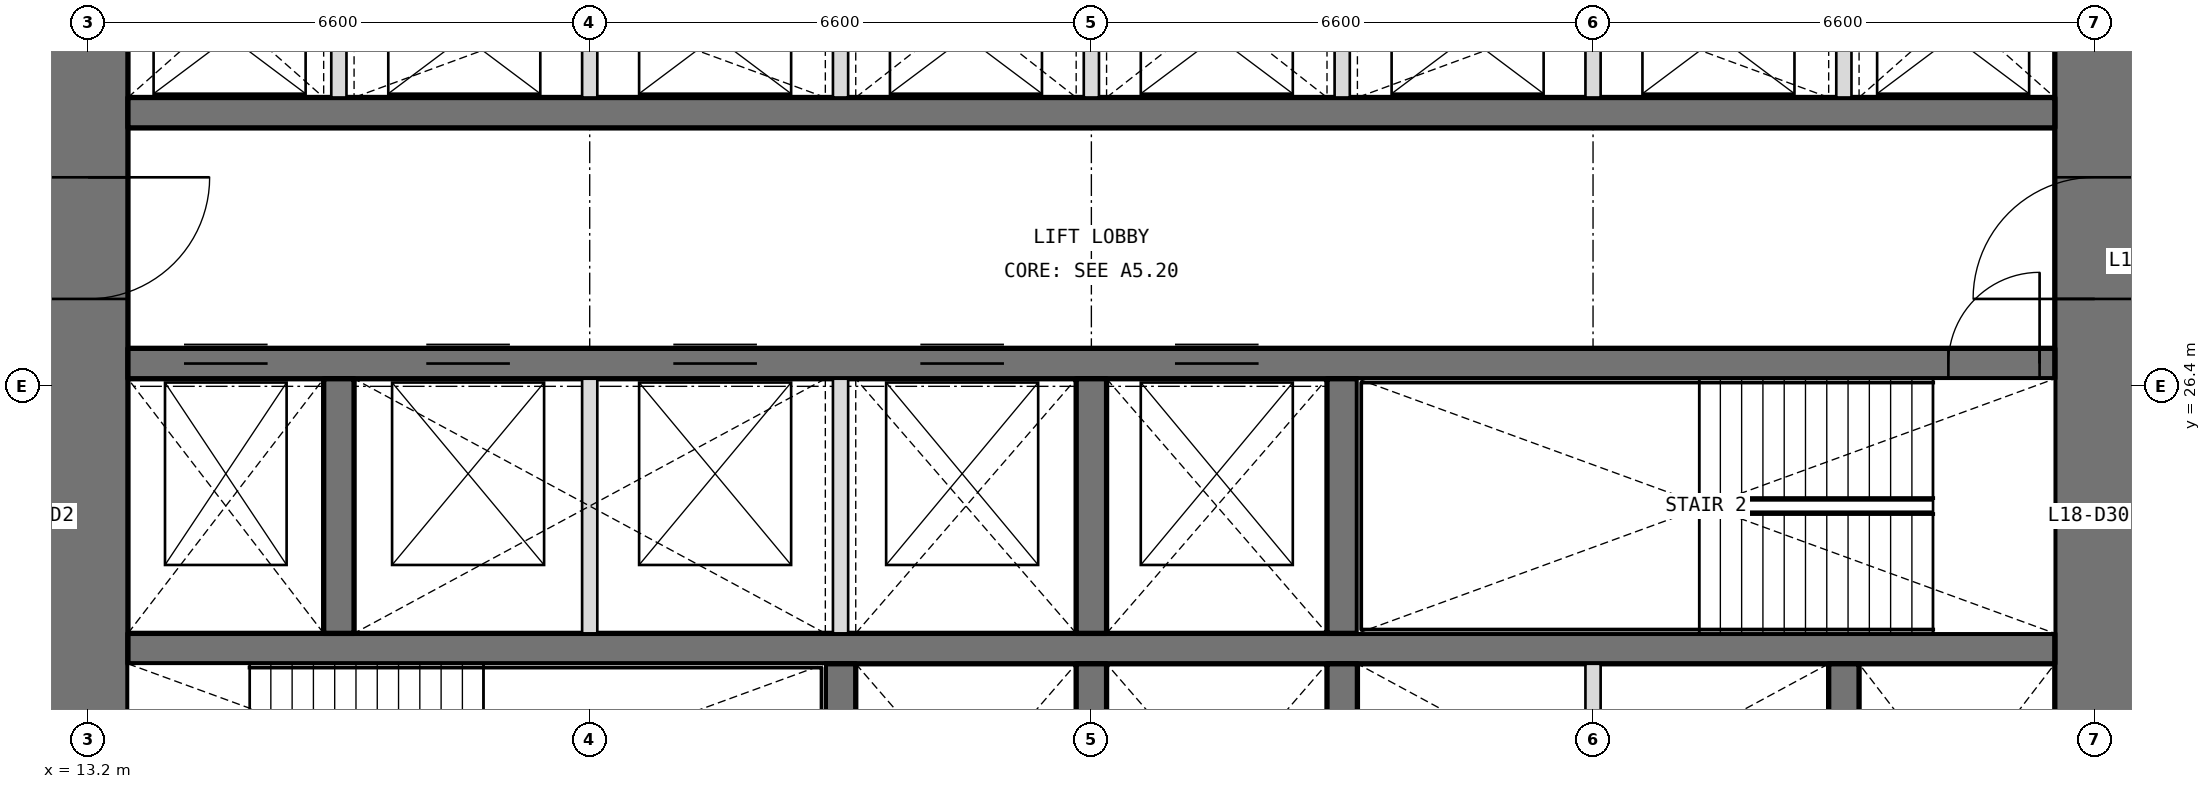
"""IFC4 building model, lengths in metres.
Left out: names, types, materials, properties, quantities, classifications, styles, units other than length and angle.
Written with IfcOpenShell. Run it as: python <this file> out.ifc"""

import sys

from ifc_helpers import new_model, si_unit, direction, frame, frame_2d, origin, place, context, subcontext, project, spatial, rectangle, extrude, element, fill, save


model = new_model("IFC4")
c1 = context("Model", 3, precision=1e-05, world=origin(), true_north=direction((0.0, 1.0)))
c2 = subcontext(c1, "Body", "Model", "MODEL_VIEW")
j1 = project(units=[si_unit("LENGTHUNIT", "METRE"), si_unit("PLANEANGLEUNIT", "RADIAN")], contexts=[c1])
p1 = place(None, origin())
s1 = spatial("IfcSite", under=j1, at=p1, CompositionType="ELEMENT")
p2 = place(p1, origin())
s2 = spatial("IfcBuilding", under=s1, at=p2, CompositionType="ELEMENT")
p3 = place(p2, frame((0.0, 0.0, 82.2)))
s3 = spatial("IfcBuildingStorey", under=s2, at=p3, CompositionType="ELEMENT", Elevation=82.2)
p4 = place(p3, frame((39.6, 13.725, 0.0), z_axis=(0.0, 0.0, 1.0), x_axis=(0.0, 1.0, 0.0)))
e1 = element("IfcWall", 1, at=p4, inside=s3, PredefinedType="SHEAR", context=c2, shape_type="SweptSolid", body=[
    extrude(rectangle(XDim=18.75, YDim=1.05, at=frame_2d((9.375, 0.0))), origin(), (0.0, 0.0, 1.0), 4.2),
])
p5 = place(p4, frame((3.025, 0.0, 0.0)))
e2 = element("IfcOpeningElement", 2, at=p5, cuts=e1, PredefinedType="OPENING", context=c2, shape_type="SweptSolid", body=[
    extrude(rectangle(XDim=1.6, YDim=2.1, at=frame_2d((0.8, 1.05))), frame((0.0, 0.535, 0.0), z_axis=(0.0, -1.0, 0.0), x_axis=(1.0, 0.0, 0.0)), (0.0, 0.0, 1.0), 1.07),
])
p6 = place(p4, frame((13.825, 0.0, 0.0)))
e3 = element("IfcOpeningElement", 3, at=p6, cuts=e1, PredefinedType="OPENING", context=c2, shape_type="SweptSolid", body=[
    extrude(rectangle(XDim=1.6, YDim=2.1, at=frame_2d((0.8, 1.05))), frame((0.0, 0.535, 0.0), z_axis=(0.0, -1.0, 0.0), x_axis=(1.0, 0.0, 0.0)), (0.0, 0.0, 1.0), 1.07),
])
p7 = place(p3, frame((13.2, 32.475, 0.0), z_axis=(0.0, 0.0, 1.0), x_axis=(0.0, -1.0, 0.0)))
e4 = element("IfcWall", 4, at=p7, inside=s3, PredefinedType="SHEAR", context=c2, shape_type="SweptSolid", body=[
    extrude(rectangle(XDim=18.75, YDim=1.05, at=frame_2d((9.375, 0.0))), origin(), (0.0, 0.0, 1.0), 4.2),
])
p8 = place(p7, frame((14.125, 0.0, 0.0)))
e5 = element("IfcOpeningElement", 5, at=p8, cuts=e4, PredefinedType="OPENING", context=c2, shape_type="SweptSolid", body=[
    extrude(rectangle(XDim=1.6, YDim=2.1, at=frame_2d((0.8, 1.05))), frame((0.0, 0.535, 0.0), z_axis=(0.0, -1.0, 0.0), x_axis=(1.0, 0.0, 0.0)), (0.0, 0.0, 1.0), 1.07),
])
p9 = place(p7, frame((3.325, 0.0, 0.0)))
e6 = element("IfcOpeningElement", 6, at=p9, cuts=e4, PredefinedType="OPENING", context=c2, shape_type="SweptSolid", body=[
    extrude(rectangle(XDim=1.6, YDim=2.1, at=frame_2d((0.8, 1.05))), frame((0.0, 0.535, 0.0), z_axis=(0.0, -1.0, 0.0), x_axis=(1.0, 0.0, 0.0)), (0.0, 0.0, 1.0), 1.07),
])
p10 = place(p3, frame((13.725, 22.95, 0.0), z_axis=(0.0, 0.0, 1.0), x_axis=(1.0, 0.0, 0.0)))
e7 = element("IfcWall", 7, at=p10, inside=s3, PredefinedType="SHEAR", context=c2, shape_type="SweptSolid", body=[
    extrude(rectangle(XDim=25.35, YDim=0.4, at=frame_2d((12.675, 0.0))), origin(), (0.0, 0.0, 1.0), 4.2),
])
p11 = place(p3, frame((13.725, 26.7, 0.0), z_axis=(0.0, 0.0, 1.0), x_axis=(1.0, 0.0, 0.0)))
e8 = element("IfcWall", 8, at=p11, inside=s3, PredefinedType="SHEAR", context=c2, shape_type="SweptSolid", body=[
    extrude(rectangle(XDim=25.35, YDim=0.4, at=frame_2d((12.675, 0.0))), origin(), (0.0, 0.0, 1.0), 4.2),
])
p12 = place(p11, frame((23.95, 0.0, 0.0)))
e9 = element("IfcOpeningElement", 9, at=p12, cuts=e8, PredefinedType="OPENING", context=c2, shape_type="SweptSolid", body=[
    extrude(rectangle(XDim=1.2, YDim=2.1, at=frame_2d((0.6, 1.05))), frame((0.0, 0.21, 0.0), z_axis=(0.0, -1.0, 0.0), x_axis=(1.0, 0.0, 0.0)), (0.0, 0.0, 1.0), 0.42),
])
p13 = place(p11, frame((0.738, 0.0, 0.0)))
e10 = element("IfcOpeningElement", 10, at=p13, cuts=e8, PredefinedType="OPENING", context=c2, shape_type="SweptSolid", body=[
    extrude(rectangle(XDim=1.1, YDim=2.1, at=frame_2d((0.55, 1.05))), frame((0.0, 0.21, 0.0), z_axis=(0.0, -1.0, 0.0), x_axis=(1.0, 0.0, 0.0)), (0.0, 0.0, 1.0), 0.42),
])
p14 = place(p11, frame((3.925, 0.0, 0.0)))
e11 = element("IfcOpeningElement", 11, at=p14, cuts=e8, PredefinedType="OPENING", context=c2, shape_type="SweptSolid", body=[
    extrude(rectangle(XDim=1.1, YDim=2.1, at=frame_2d((0.55, 1.05))), frame((0.0, 0.21, 0.0), z_axis=(0.0, -1.0, 0.0), x_axis=(1.0, 0.0, 0.0)), (0.0, 0.0, 1.0), 0.42),
])
p15 = place(p11, frame((7.175, 0.0, 0.0)))
e12 = element("IfcOpeningElement", 12, at=p15, cuts=e8, PredefinedType="OPENING", context=c2, shape_type="SweptSolid", body=[
    extrude(rectangle(XDim=1.1, YDim=2.1, at=frame_2d((0.55, 1.05))), frame((0.0, 0.21, 0.0), z_axis=(0.0, -1.0, 0.0), x_axis=(1.0, 0.0, 0.0)), (0.0, 0.0, 1.0), 0.42),
])
p16 = place(p11, frame((10.425, 0.0, 0.0)))
e13 = element("IfcOpeningElement", 13, at=p16, cuts=e8, PredefinedType="OPENING", context=c2, shape_type="SweptSolid", body=[
    extrude(rectangle(XDim=1.1, YDim=2.1, at=frame_2d((0.55, 1.05))), frame((0.0, 0.21, 0.0), z_axis=(0.0, -1.0, 0.0), x_axis=(1.0, 0.0, 0.0)), (0.0, 0.0, 1.0), 0.42),
])
p17 = place(p11, frame((13.775, 0.0, 0.0)))
e14 = element("IfcOpeningElement", 14, at=p17, cuts=e8, PredefinedType="OPENING", context=c2, shape_type="SweptSolid", body=[
    extrude(rectangle(XDim=1.1, YDim=2.1, at=frame_2d((0.55, 1.05))), frame((0.0, 0.21, 0.0), z_axis=(0.0, -1.0, 0.0), x_axis=(1.0, 0.0, 0.0)), (0.0, 0.0, 1.0), 0.42),
])
p18 = place(p3, frame((13.725, 30.0, 0.0), z_axis=(0.0, 0.0, 1.0), x_axis=(1.0, 0.0, 0.0)))
e15 = element("IfcWall", 15, at=p18, inside=s3, PredefinedType="SHEAR", context=c2, shape_type="SweptSolid", body=[
    extrude(rectangle(XDim=25.35, YDim=0.4, at=frame_2d((12.675, 0.0))), origin(), (0.0, 0.0, 1.0), 4.2),
])
for number, where, z_axis, x_axis in (
    (16, (23.1, 19.4, 0.0), (0.0, 0.0, 1.0), (0.0, 1.0, 0.0)),
    (17, (26.4, 19.4, 0.0), (0.0, 0.0, 1.0), (0.0, 1.0, 0.0)),
    (18, (29.7, 19.4, 0.0), (0.0, 0.0, 1.0), (0.0, 1.0, 0.0)),
    (19, (36.3, 19.4, 0.0), (0.0, 0.0, 1.0), (0.0, 1.0, 0.0)),
    (20, (16.5, 23.15, 0.0), (0.0, 0.0, 1.0), (0.0, 1.0, 0.0)),
    (21, (26.4, 23.15, 0.0), (0.0, 0.0, 1.0), (0.0, 1.0, 0.0)),
    (22, (29.7, 23.15, 0.0), (0.0, 0.0, 1.0), (0.0, 1.0, 0.0)),
):
    element("IfcWall", number, at=place(p3, frame(where, z_axis=z_axis, x_axis=x_axis)), inside=s3, PredefinedType="SHEAR", context=c2, shape_type="SweptSolid", body=[
        extrude(rectangle(XDim=3.35, YDim=0.4, at=frame_2d((1.675, 0.0))), origin(), (0.0, 0.0, 1.0), 4.2),
    ])
for number, where, z_axis, x_axis in (
    (23, (16.5, 30.2, 0.0), (0.0, 0.0, 1.0), (0.0, 1.0, 0.0)),
    (24, (19.8, 30.2, 0.0), (0.0, 0.0, 1.0), (0.0, 1.0, 0.0)),
    (25, (23.1, 30.2, 0.0), (0.0, 0.0, 1.0), (0.0, 1.0, 0.0)),
    (26, (26.4, 30.2, 0.0), (0.0, 0.0, 1.0), (0.0, 1.0, 0.0)),
    (27, (29.7, 30.2, 0.0), (0.0, 0.0, 1.0), (0.0, 1.0, 0.0)),
    (28, (33.0, 30.2, 0.0), (0.0, 0.0, 1.0), (0.0, 1.0, 0.0)),
    (29, (36.3, 30.2, 0.0), (0.0, 0.0, 1.0), (0.0, 1.0, 0.0)),
):
    element("IfcWall", number, at=place(p3, frame(where, z_axis=z_axis, x_axis=x_axis)), inside=s3, PredefinedType="PARTITIONING", context=c2, shape_type="SweptSolid", body=[
        extrude(rectangle(XDim=2.275, YDim=0.2, at=frame_2d((1.138, 0.0))), origin(), (0.0, 0.0, 1.0), 4.2),
    ])
for number, where, z_axis, x_axis in (
    (30, (33.0, 19.4, 0.0), (0.0, 0.0, 1.0), (0.0, 1.0, 0.0)),
    (31, (19.8, 23.15, 0.0), (0.0, 0.0, 1.0), (0.0, 1.0, 0.0)),
    (32, (23.1, 23.15, 0.0), (0.0, 0.0, 1.0), (0.0, 1.0, 0.0)),
):
    element("IfcWall", number, at=place(p3, frame(where, z_axis=z_axis, x_axis=x_axis)), inside=s3, PredefinedType="PARTITIONING", context=c2, shape_type="SweptSolid", body=[
        extrude(rectangle(XDim=3.35, YDim=0.2, at=frame_2d((1.675, 0.0))), origin(), (0.0, 0.0, 1.0), 4.2),
    ])
p19 = place(p12, origin())
e33 = element("IfcDoor", 33, at=p19, inside=s3, OperationType="SINGLE_SWING_RIGHT", PredefinedType="DOOR", context=c2, shape_type="SweptSolid", body=[
    extrude(rectangle(XDim=1.2, YDim=2.1, at=frame_2d((0.6, 1.05))), frame((0.0, 0.025, 0.0), z_axis=(0.0, -1.0, 0.0), x_axis=(1.0, 0.0, 0.0)), (0.0, 0.0, 1.0), 0.05),
])
fill(e9, e33)
p20 = place(p9, origin())
e34 = element("IfcDoor", 34, at=p20, inside=s3, OperationType="DOUBLE_DOOR_DOUBLE_SWING", PredefinedType="DOOR", context=c2, shape_type="SweptSolid", body=[
    extrude(rectangle(XDim=1.6, YDim=2.1, at=frame_2d((0.8, 1.05))), frame((0.0, 0.025, 0.0), z_axis=(0.0, -1.0, 0.0), x_axis=(1.0, 0.0, 0.0)), (0.0, 0.0, 1.0), 0.05),
])
fill(e6, e34)
p21 = place(p6, origin())
e35 = element("IfcDoor", 35, at=p21, inside=s3, OperationType="DOUBLE_DOOR_DOUBLE_SWING", PredefinedType="DOOR", context=c2, shape_type="SweptSolid", body=[
    extrude(rectangle(XDim=1.6, YDim=2.1, at=frame_2d((0.8, 1.05))), frame((0.0, 0.025, 0.0), z_axis=(0.0, -1.0, 0.0), x_axis=(1.0, 0.0, 0.0)), (0.0, 0.0, 1.0), 0.05),
])
fill(e3, e35)
p22 = place(p13, origin())
e36 = element("IfcDoor", 36, at=p22, inside=s3, OperationType="DOUBLE_DOOR_SLIDING", PredefinedType="DOOR", context=c2, shape_type="SweptSolid", body=[
    extrude(rectangle(XDim=1.1, YDim=2.1, at=frame_2d((0.55, 1.05))), frame((0.0, 0.025, 0.0), z_axis=(0.0, -1.0, 0.0), x_axis=(1.0, 0.0, 0.0)), (0.0, 0.0, 1.0), 0.05),
])
fill(e10, e36)
p23 = place(p14, origin())
e37 = element("IfcDoor", 37, at=p23, inside=s3, OperationType="DOUBLE_DOOR_SLIDING", PredefinedType="DOOR", context=c2, shape_type="SweptSolid", body=[
    extrude(rectangle(XDim=1.1, YDim=2.1, at=frame_2d((0.55, 1.05))), frame((0.0, 0.025, 0.0), z_axis=(0.0, -1.0, 0.0), x_axis=(1.0, 0.0, 0.0)), (0.0, 0.0, 1.0), 0.05),
])
fill(e11, e37)
p24 = place(p15, origin())
e38 = element("IfcDoor", 38, at=p24, inside=s3, OperationType="DOUBLE_DOOR_SLIDING", PredefinedType="DOOR", context=c2, shape_type="SweptSolid", body=[
    extrude(rectangle(XDim=1.1, YDim=2.1, at=frame_2d((0.55, 1.05))), frame((0.0, 0.025, 0.0), z_axis=(0.0, -1.0, 0.0), x_axis=(1.0, 0.0, 0.0)), (0.0, 0.0, 1.0), 0.05),
])
fill(e12, e38)
p25 = place(p16, origin())
e39 = element("IfcDoor", 39, at=p25, inside=s3, OperationType="DOUBLE_DOOR_SLIDING", PredefinedType="DOOR", context=c2, shape_type="SweptSolid", body=[
    extrude(rectangle(XDim=1.1, YDim=2.1, at=frame_2d((0.55, 1.05))), frame((0.0, 0.025, 0.0), z_axis=(0.0, -1.0, 0.0), x_axis=(1.0, 0.0, 0.0)), (0.0, 0.0, 1.0), 0.05),
])
fill(e13, e39)
p26 = place(p17, origin())
e40 = element("IfcDoor", 40, at=p26, inside=s3, OperationType="DOUBLE_DOOR_SLIDING", PredefinedType="DOOR", context=c2, shape_type="SweptSolid", body=[
    extrude(rectangle(XDim=1.1, YDim=2.1, at=frame_2d((0.55, 1.05))), frame((0.0, 0.025, 0.0), z_axis=(0.0, -1.0, 0.0), x_axis=(1.0, 0.0, 0.0)), (0.0, 0.0, 1.0), 0.05),
])
fill(e14, e40)
save(model, sys.argv[1])
